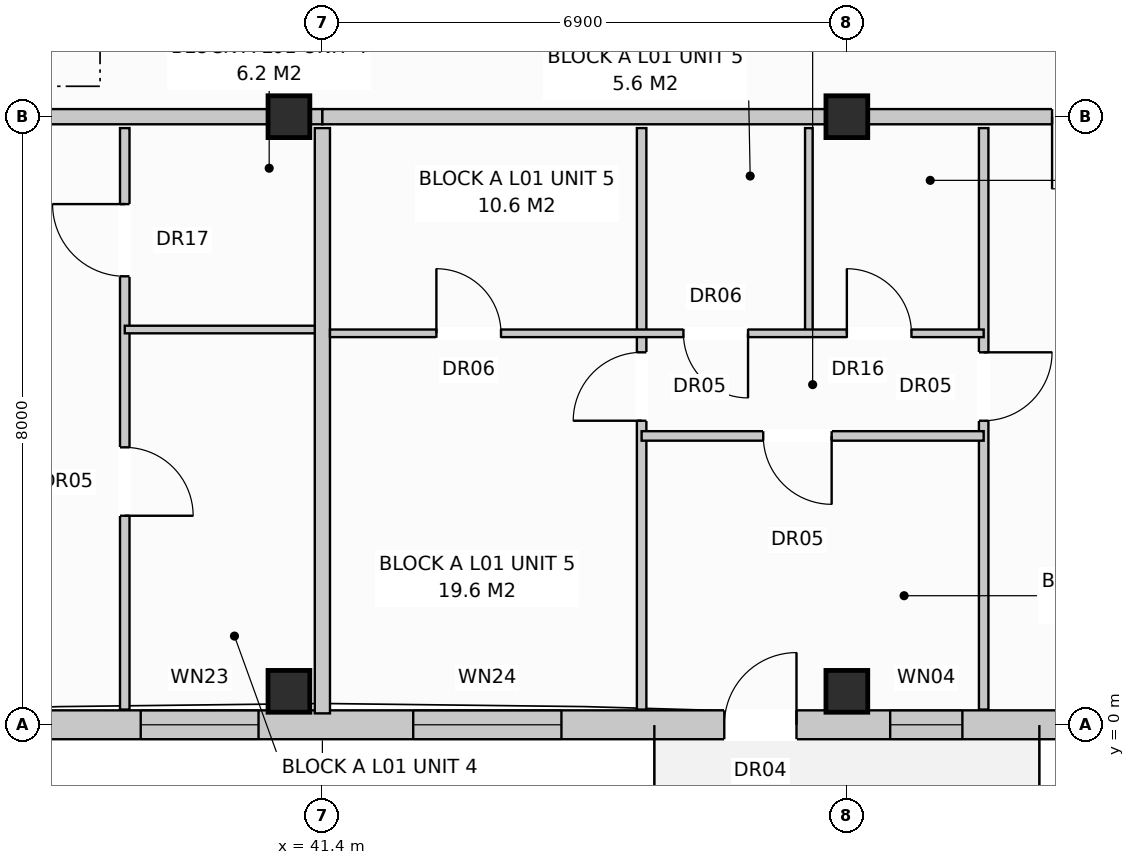
"""IFC4 building model, lengths in metres.
Left out: names, types, materials, properties, quantities, classifications, styles, units other than length and angle.
Written with IfcOpenShell. Run it as: python <this file> out.ifc"""

import sys

from ifc_helpers import new_model, si_unit, direction, frame, frame_2d, origin, origin_with_axes, origin_2d, place, context, subcontext, project, spatial, rectangle, extrude, element, fill, save


model = new_model("IFC4")
c1 = context("Model", 3, precision=1e-05, world=origin(), true_north=direction((0.0, 1.0)))
c2 = subcontext(c1, "Body", "Model", "MODEL_VIEW")
j1 = project(units=[si_unit("LENGTHUNIT", "METRE"), si_unit("PLANEANGLEUNIT", "RADIAN")], contexts=[c1])
p1 = place(None, origin())
s1 = spatial("IfcSite", under=j1, at=p1, CompositionType="ELEMENT")
p2 = place(p1, origin())
s2 = spatial("IfcBuilding", under=s1, at=p2, CompositionType="ELEMENT")
p3 = place(p2, frame((0.0, 0.0, 4.4)))
s3 = spatial("IfcBuildingStorey", under=s2, at=p3, CompositionType="ELEMENT", Elevation=4.4)
for number, where, z_axis, x_axis in (
    (1, (40.96, 0.44, 0.0), (0.0, 0.0, 1.0), (1.0, 0.0, 0.0)),
    (2, (40.96, 8.0, 0.0), (0.0, 0.0, 1.0), (1.0, 0.0, 0.0)),
    (3, (48.3, 0.44, 0.0), (0.0, 0.0, 1.0), (1.0, 0.0, 0.0)),
    (4, (48.3, 8.0, 0.0), (0.0, 0.0, 1.0), (1.0, 0.0, 0.0)),
):
    element("IfcColumn", number, at=place(p3, frame(where, z_axis=z_axis, x_axis=x_axis)), inside=s3, PredefinedType="COLUMN", context=c2, shape_type="SweptSolid", body=[
        extrude(rectangle(XDim=0.55, YDim=0.55, at=origin_2d()), origin(), (0.0, 0.0, 1.0), 3.6),
    ])
p4 = place(p3, frame((0.18, 0.0, 0.0), z_axis=(0.0, 0.0, 1.0), x_axis=(1.0, 0.0, 0.0)))
e5 = element("IfcWall", 5, at=p4, inside=s3, PredefinedType="STANDARD", context=c2, shape_type="SweptSolid", body=[
    extrude(rectangle(XDim=54.84, YDim=0.38, at=frame_2d((27.42, 0.0))), origin(), (0.0, 0.0, 1.0), 3.33),
])
p5 = place(p4, frame((5.09, 0.0, 0.0)))
e6 = element("IfcOpeningElement", 6, at=p5, cuts=e5, PredefinedType="OPENING", context=c2, shape_type="SweptSolid", body=[
    extrude(rectangle(XDim=0.95, YDim=2.1, at=frame_2d((0.475, 1.05))), frame((0.0, 0.202, 0.0), z_axis=(0.0, -1.0, 0.0), x_axis=(1.0, 0.0, 0.0)), (0.0, 0.0, 1.0), 0.404),
])
p6 = place(p4, frame((18.89, 0.0, 0.0)))
e7 = element("IfcOpeningElement", 7, at=p6, cuts=e5, PredefinedType="OPENING", context=c2, shape_type="SweptSolid", body=[
    extrude(rectangle(XDim=0.95, YDim=2.1, at=frame_2d((0.475, 1.05))), frame((0.0, 0.202, 0.0), z_axis=(0.0, -1.0, 0.0), x_axis=(1.0, 0.0, 0.0)), (0.0, 0.0, 1.0), 0.404),
])
p7 = place(p4, frame((32.69, 0.0, 0.0)))
e8 = element("IfcOpeningElement", 8, at=p7, cuts=e5, PredefinedType="OPENING", context=c2, shape_type="SweptSolid", body=[
    extrude(rectangle(XDim=0.95, YDim=2.1, at=frame_2d((0.475, 1.05))), frame((0.0, 0.202, 0.0), z_axis=(0.0, -1.0, 0.0), x_axis=(1.0, 0.0, 0.0)), (0.0, 0.0, 1.0), 0.404),
])
p8 = place(p4, frame((46.507, 0.0, 0.0)))
e9 = element("IfcOpeningElement", 9, at=p8, cuts=e5, PredefinedType="OPENING", context=c2, shape_type="SweptSolid", body=[
    extrude(rectangle(XDim=0.95, YDim=2.1, at=frame_2d((0.475, 1.05))), frame((0.0, 0.202, 0.0), z_axis=(0.0, -1.0, 0.0), x_axis=(1.0, 0.0, 0.0)), (0.0, 0.0, 1.0), 0.404),
])
p9 = place(p4, frame((0.89, 0.0, 0.8)))
e10 = element("IfcOpeningElement", 10, at=p9, cuts=e5, PredefinedType="OPENING", context=c2, shape_type="SweptSolid", body=[
    extrude(rectangle(XDim=1.8, YDim=1.7, at=frame_2d((0.9, 0.85))), frame((0.0, 0.202, 0.0), z_axis=(0.0, -1.0, 0.0), x_axis=(1.0, 0.0, 0.0)), (0.0, 0.0, 1.0), 0.404),
])
p10 = place(p4, frame((8.94, 0.0, 0.8)))
e11 = element("IfcOpeningElement", 11, at=p10, cuts=e5, PredefinedType="OPENING", context=c2, shape_type="SweptSolid", body=[
    extrude(rectangle(XDim=1.9, YDim=1.85, at=frame_2d((0.95, 0.925))), frame((0.0, 0.202, 0.0), z_axis=(0.0, -1.0, 0.0), x_axis=(1.0, 0.0, 0.0)), (0.0, 0.0, 1.0), 0.404),
])
p11 = place(p4, frame((14.615, 0.0, 0.8)))
e12 = element("IfcOpeningElement", 12, at=p11, cuts=e5, PredefinedType="OPENING", context=c2, shape_type="SweptSolid", body=[
    extrude(rectangle(XDim=1.95, YDim=1.65, at=frame_2d((0.975, 0.825))), frame((0.0, 0.202, 0.0), z_axis=(0.0, -1.0, 0.0), x_axis=(1.0, 0.0, 0.0)), (0.0, 0.0, 1.0), 0.404),
])
p12 = place(p4, frame((21.09, 0.0, 0.8)))
e13 = element("IfcOpeningElement", 13, at=p12, cuts=e5, PredefinedType="OPENING", context=c2, shape_type="SweptSolid", body=[
    extrude(rectangle(XDim=1.8, YDim=1.7, at=frame_2d((0.9, 0.85))), frame((0.0, 0.202, 0.0), z_axis=(0.0, -1.0, 0.0), x_axis=(1.0, 0.0, 0.0)), (0.0, 0.0, 1.0), 0.404),
])
p13 = place(p4, frame((24.44, 0.0, 0.8)))
e14 = element("IfcOpeningElement", 14, at=p13, cuts=e5, PredefinedType="OPENING", context=c2, shape_type="SweptSolid", body=[
    extrude(rectangle(XDim=1.9, YDim=1.85, at=frame_2d((0.95, 0.925))), frame((0.0, 0.202, 0.0), z_axis=(0.0, -1.0, 0.0), x_axis=(1.0, 0.0, 0.0)), (0.0, 0.0, 1.0), 0.404),
])
p14 = place(p4, frame((28.415, 0.0, 0.8)))
e15 = element("IfcOpeningElement", 15, at=p14, cuts=e5, PredefinedType="OPENING", context=c2, shape_type="SweptSolid", body=[
    extrude(rectangle(XDim=1.95, YDim=1.65, at=frame_2d((0.975, 0.825))), frame((0.0, 0.202, 0.0), z_axis=(0.0, -1.0, 0.0), x_axis=(1.0, 0.0, 0.0)), (0.0, 0.0, 1.0), 0.404),
])
p15 = place(p4, frame((35.59, 0.0, 0.8)))
e16 = element("IfcOpeningElement", 16, at=p15, cuts=e5, PredefinedType="OPENING", context=c2, shape_type="SweptSolid", body=[
    extrude(rectangle(XDim=1.8, YDim=1.7, at=frame_2d((0.9, 0.85))), frame((0.0, 0.202, 0.0), z_axis=(0.0, -1.0, 0.0), x_axis=(1.0, 0.0, 0.0)), (0.0, 0.0, 1.0), 0.404),
])
p16 = place(p4, frame((38.83, 0.0, 0.8)))
e17 = element("IfcOpeningElement", 17, at=p16, cuts=e5, PredefinedType="OPENING", context=c2, shape_type="SweptSolid", body=[
    extrude(rectangle(XDim=1.55, YDim=1.55, at=frame_2d((0.775, 0.775))), frame((0.0, 0.202, 0.0), z_axis=(0.0, -1.0, 0.0), x_axis=(1.0, 0.0, 0.0)), (0.0, 0.0, 1.0), 0.404),
])
p17 = place(p4, frame((42.415, 0.0, 0.8)))
e18 = element("IfcOpeningElement", 18, at=p17, cuts=e5, PredefinedType="OPENING", context=c2, shape_type="SweptSolid", body=[
    extrude(rectangle(XDim=1.95, YDim=1.65, at=frame_2d((0.975, 0.825))), frame((0.0, 0.202, 0.0), z_axis=(0.0, -1.0, 0.0), x_axis=(1.0, 0.0, 0.0)), (0.0, 0.0, 1.0), 0.404),
])
p18 = place(p4, frame((48.69, 0.0, 0.9)))
e19 = element("IfcOpeningElement", 19, at=p18, cuts=e5, PredefinedType="OPENING", context=c2, shape_type="SweptSolid", body=[
    extrude(rectangle(XDim=0.95, YDim=1.55, at=frame_2d((0.475, 0.775))), frame((0.0, 0.202, 0.0), z_axis=(0.0, -1.0, 0.0), x_axis=(1.0, 0.0, 0.0)), (0.0, 0.0, 1.0), 0.404),
])
p19 = place(p4, frame((51.44, 0.0, 0.8)))
e20 = element("IfcOpeningElement", 20, at=p19, cuts=e5, PredefinedType="OPENING", context=c2, shape_type="SweptSolid", body=[
    extrude(rectangle(XDim=1.9, YDim=1.85, at=frame_2d((0.95, 0.925))), frame((0.0, 0.202, 0.0), z_axis=(0.0, -1.0, 0.0), x_axis=(1.0, 0.0, 0.0)), (0.0, 0.0, 1.0), 0.404),
])
p20 = place(p3, frame((41.4, 7.85, 0.0), z_axis=(0.0, 0.0, 1.0), x_axis=(0.0, -1.0, 0.0)))
e21 = element("IfcWall", 21, at=p20, inside=s3, PredefinedType="PARTITIONING", context=c2, shape_type="SweptSolid", body=[
    extrude(rectangle(XDim=7.7, YDim=0.2, at=frame_2d((3.85, 0.0))), origin(), (0.0, 0.0, 1.0), 3.33),
])
p21 = place(p3, frame((34.5, 8.0, 0.0), z_axis=(0.0, 0.0, 1.0), x_axis=(1.0, 0.0, 0.0)))
e22 = element("IfcWall", 22, at=p21, inside=s3, PredefinedType="PARTITIONING", context=c2, shape_type="SweptSolid", body=[
    extrude(rectangle(XDim=6.9, YDim=0.2, at=frame_2d((3.45, 0.0))), origin(), (0.0, 0.0, 1.0), 2.77),
])
p22 = place(p21, frame((2.0, 0.0, 0.0)))
e23 = element("IfcOpeningElement", 23, at=p22, cuts=e22, PredefinedType="OPENING", context=c2, shape_type="SweptSolid", body=[
    extrude(rectangle(XDim=0.95, YDim=2.15, at=frame_2d((0.475, 1.075))), frame((0.0, 0.112, 0.0), z_axis=(0.0, -1.0, 0.0), x_axis=(1.0, 0.0, 0.0)), (0.0, 0.0, 1.0), 0.224),
])
p23 = place(p3, frame((38.8, 7.85, 0.0), z_axis=(0.0, 0.0, 1.0), x_axis=(0.0, -1.0, 0.0)))
e24 = element("IfcWall", 24, at=p23, inside=s3, PredefinedType="PARTITIONING", context=c2, shape_type="SweptSolid", body=[
    extrude(rectangle(XDim=7.65, YDim=0.125, at=frame_2d((3.825, 0.0))), origin(), (0.0, 0.0, 1.0), 3.33),
])
p24 = place(p23, frame((1.0, 0.0, 0.0)))
e25 = element("IfcOpeningElement", 25, at=p24, cuts=e24, PredefinedType="OPENING", context=c2, shape_type="SweptSolid", body=[
    extrude(rectangle(XDim=0.95, YDim=2.1, at=frame_2d((0.475, 1.05))), frame((0.0, 0.074, 0.0), z_axis=(0.0, -1.0, 0.0), x_axis=(1.0, 0.0, 0.0)), (0.0, 0.0, 1.0), 0.149),
])
p25 = place(p23, frame((4.2, 0.0, 0.0)))
e26 = element("IfcOpeningElement", 26, at=p25, cuts=e24, PredefinedType="OPENING", context=c2, shape_type="SweptSolid", body=[
    extrude(rectangle(XDim=0.9, YDim=2.1, at=frame_2d((0.45, 1.05))), frame((0.0, 0.074, 0.0), z_axis=(0.0, -1.0, 0.0), x_axis=(1.0, 0.0, 0.0)), (0.0, 0.0, 1.0), 0.149),
])
p26 = place(p3, frame((38.8, 5.2, 0.0), z_axis=(0.0, 0.0, 1.0), x_axis=(1.0, 0.0, 0.0)))
e27 = element("IfcWall", 27, at=p26, inside=s3, PredefinedType="PARTITIONING", context=c2, shape_type="SweptSolid", body=[
    extrude(rectangle(XDim=2.5, YDim=0.1, at=frame_2d((1.25, 0.0))), origin(), (0.0, 0.0, 1.0), 3.33),
])
p27 = place(p3, frame((41.4, 8.0, 0.0), z_axis=(0.0, 0.0, 1.0), x_axis=(1.0, 0.0, 0.0)))
e28 = element("IfcWall", 28, at=p27, inside=s3, PredefinedType="PARTITIONING", context=c2, shape_type="SweptSolid", body=[
    extrude(rectangle(XDim=13.8, YDim=0.2, at=frame_2d((6.9, 0.0))), origin(), (0.0, 0.0, 1.0), 2.77),
])
p28 = place(p27, frame((9.6, 0.0, 0.0)))
e29 = element("IfcOpeningElement", 29, at=p28, cuts=e28, PredefinedType="OPENING", context=c2, shape_type="SweptSolid", body=[
    extrude(rectangle(XDim=0.95, YDim=2.15, at=frame_2d((0.475, 1.075))), frame((0.0, 0.112, 0.0), z_axis=(0.0, -1.0, 0.0), x_axis=(1.0, 0.0, 0.0)), (0.0, 0.0, 1.0), 0.224),
])
p29 = place(p3, frame((50.1, 7.85, 0.0), z_axis=(0.0, 0.0, 1.0), x_axis=(0.0, -1.0, 0.0)))
e30 = element("IfcWall", 30, at=p29, inside=s3, PredefinedType="PARTITIONING", context=c2, shape_type="SweptSolid", body=[
    extrude(rectangle(XDim=7.65, YDim=0.125, at=frame_2d((3.825, 0.0))), origin(), (0.0, 0.0, 1.0), 3.33),
])
p30 = place(p29, frame((2.95, 0.0, 0.0)))
e31 = element("IfcOpeningElement", 31, at=p30, cuts=e30, PredefinedType="OPENING", context=c2, shape_type="SweptSolid", body=[
    extrude(rectangle(XDim=0.9, YDim=2.1, at=frame_2d((0.45, 1.05))), frame((0.0, 0.074, 0.0), z_axis=(0.0, -1.0, 0.0), x_axis=(1.0, 0.0, 0.0)), (0.0, 0.0, 1.0), 0.149),
])
p31 = place(p3, frame((45.6, 7.85, 0.0), z_axis=(0.0, 0.0, 1.0), x_axis=(0.0, -1.0, 0.0)))
e32 = element("IfcWall", 32, at=p31, inside=s3, PredefinedType="PARTITIONING", context=c2, shape_type="SweptSolid", body=[
    extrude(rectangle(XDim=7.65, YDim=0.125, at=frame_2d((3.825, 0.0))), origin(), (0.0, 0.0, 1.0), 3.33),
])
p32 = place(p31, frame((2.95, 0.0, 0.0)))
e33 = element("IfcOpeningElement", 33, at=p32, cuts=e32, PredefinedType="OPENING", context=c2, shape_type="SweptSolid", body=[
    extrude(rectangle(XDim=0.9, YDim=2.1, at=frame_2d((0.45, 1.05))), frame((0.0, 0.074, 0.0), z_axis=(0.0, -1.0, 0.0), x_axis=(1.0, 0.0, 0.0)), (0.0, 0.0, 1.0), 0.149),
])
p33 = place(p3, frame((47.8, 7.85, 0.0), z_axis=(0.0, 0.0, 1.0), x_axis=(0.0, -1.0, 0.0)))
e34 = element("IfcWall", 34, at=p33, inside=s3, PredefinedType="PARTITIONING", context=c2, shape_type="SweptSolid", body=[
    extrude(rectangle(XDim=2.7, YDim=0.1, at=frame_2d((1.35, 0.0))), origin(), (0.0, 0.0, 1.0), 3.33),
])
p34 = place(p3, frame((41.5, 5.15, 0.0), z_axis=(0.0, 0.0, 1.0), x_axis=(1.0, 0.0, 0.0)))
e35 = element("IfcWall", 35, at=p34, inside=s3, PredefinedType="PARTITIONING", context=c2, shape_type="SweptSolid", body=[
    extrude(rectangle(XDim=8.6, YDim=0.1, at=frame_2d((4.3, 0.0))), origin(), (0.0, 0.0, 1.0), 3.33),
])
p35 = place(p34, frame((1.4, 0.0, 0.0)))
e36 = element("IfcOpeningElement", 36, at=p35, cuts=e35, PredefinedType="OPENING", context=c2, shape_type="SweptSolid", body=[
    extrude(rectangle(XDim=0.85, YDim=2.05, at=frame_2d((0.425, 1.025))), frame((0.0, 0.062, 0.0), z_axis=(0.0, -1.0, 0.0), x_axis=(1.0, 0.0, 0.0)), (0.0, 0.0, 1.0), 0.124),
])
p36 = place(p34, frame((4.65, 0.0, 0.0)))
e37 = element("IfcOpeningElement", 37, at=p36, cuts=e35, PredefinedType="OPENING", context=c2, shape_type="SweptSolid", body=[
    extrude(rectangle(XDim=0.85, YDim=2.05, at=frame_2d((0.425, 1.025))), frame((0.0, 0.062, 0.0), z_axis=(0.0, -1.0, 0.0), x_axis=(1.0, 0.0, 0.0)), (0.0, 0.0, 1.0), 0.124),
])
p37 = place(p34, frame((6.8, 0.0, 0.0)))
e38 = element("IfcOpeningElement", 38, at=p37, cuts=e35, PredefinedType="OPENING", context=c2, shape_type="SweptSolid", body=[
    extrude(rectangle(XDim=0.85, YDim=2.1, at=frame_2d((0.425, 1.05))), frame((0.0, 0.062, 0.0), z_axis=(0.0, -1.0, 0.0), x_axis=(1.0, 0.0, 0.0)), (0.0, 0.0, 1.0), 0.124),
])
p38 = place(p3, frame((45.6, 3.8, 0.0), z_axis=(0.0, 0.0, 1.0), x_axis=(1.0, 0.0, 0.0)))
e39 = element("IfcWall", 39, at=p38, inside=s3, PredefinedType="PARTITIONING", context=c2, shape_type="SweptSolid", body=[
    extrude(rectangle(XDim=4.5, YDim=0.125, at=frame_2d((2.25, 0.0))), origin(), (0.0, 0.0, 1.0), 3.33),
])
p39 = place(p38, frame((1.6, 0.0, 0.0)))
e40 = element("IfcOpeningElement", 40, at=p39, cuts=e39, PredefinedType="OPENING", context=c2, shape_type="SweptSolid", body=[
    extrude(rectangle(XDim=0.9, YDim=2.1, at=frame_2d((0.45, 1.05))), frame((0.0, 0.074, 0.0), z_axis=(0.0, -1.0, 0.0), x_axis=(1.0, 0.0, 0.0)), (0.0, 0.0, 1.0), 0.149),
])
p40 = place(p8, origin_with_axes())
e41 = element("IfcDoor", 41, at=p40, inside=s3, OperationType="SINGLE_SWING_RIGHT", PredefinedType="DOOR", context=c2, shape_type="SweptSolid", body=[
    extrude(rectangle(XDim=0.95, YDim=2.1, at=frame_2d((0.475, 1.05))), frame((0.0, 0.025, 0.0), z_axis=(0.0, -1.0, 0.0), x_axis=(1.0, 0.0, 0.0)), (0.0, 0.0, 1.0), 0.05),
])
fill(e9, e41)
p41 = place(p16, origin_with_axes())
e42 = element("IfcWindow", 42, at=p41, inside=s3, PartitioningType="SINGLE_PANEL", PredefinedType="WINDOW", context=c2, shape_type="SweptSolid", body=[
    extrude(rectangle(XDim=1.55, YDim=1.55, at=frame_2d((0.775, 0.775))), frame((0.0, 0.03, 0.0), z_axis=(0.0, -1.0, 0.0), x_axis=(1.0, 0.0, 0.0)), (0.0, 0.0, 1.0), 0.06),
])
fill(e17, e42)
p42 = place(p17, origin_with_axes())
e43 = element("IfcWindow", 43, at=p42, inside=s3, PartitioningType="SINGLE_PANEL", PredefinedType="WINDOW", context=c2, shape_type="SweptSolid", body=[
    extrude(rectangle(XDim=1.95, YDim=1.65, at=frame_2d((0.975, 0.825))), frame((0.0, 0.03, 0.0), z_axis=(0.0, -1.0, 0.0), x_axis=(1.0, 0.0, 0.0)), (0.0, 0.0, 1.0), 0.06),
])
fill(e18, e43)
p43 = place(p18, origin_with_axes())
e44 = element("IfcWindow", 44, at=p43, inside=s3, PartitioningType="SINGLE_PANEL", PredefinedType="WINDOW", context=c2, shape_type="SweptSolid", body=[
    extrude(rectangle(XDim=0.95, YDim=1.55, at=frame_2d((0.475, 0.775))), frame((0.0, 0.03, 0.0), z_axis=(0.0, -1.0, 0.0), x_axis=(1.0, 0.0, 0.0)), (0.0, 0.0, 1.0), 0.06),
])
fill(e19, e44)
p44 = place(p24, frame((0.95, 0.0, 0.0), z_axis=(0.0, 0.0, 1.0), x_axis=(-1.0, 0.0, 0.0)))
e45 = element("IfcDoor", 45, at=p44, inside=s3, OperationType="SINGLE_SWING_LEFT", PredefinedType="DOOR", context=c2, shape_type="SweptSolid", body=[
    extrude(rectangle(XDim=0.95, YDim=2.1, at=frame_2d((0.475, 1.05))), frame((0.0, 0.025, 0.0), z_axis=(0.0, -1.0, 0.0), x_axis=(1.0, 0.0, 0.0)), (0.0, 0.0, 1.0), 0.05),
])
fill(e25, e45)
p45 = place(p25, origin_with_axes())
e46 = element("IfcDoor", 46, at=p45, inside=s3, OperationType="SINGLE_SWING_RIGHT", PredefinedType="DOOR", context=c2, shape_type="SweptSolid", body=[
    extrude(rectangle(XDim=0.9, YDim=2.1, at=frame_2d((0.45, 1.05))), frame((0.0, 0.025, 0.0), z_axis=(0.0, -1.0, 0.0), x_axis=(1.0, 0.0, 0.0)), (0.0, 0.0, 1.0), 0.05),
])
fill(e26, e46)
p46 = place(p28, frame((0.95, 0.0, 0.0), z_axis=(0.0, 0.0, 1.0), x_axis=(-1.0, 0.0, 0.0)))
e47 = element("IfcDoor", 47, at=p46, inside=s3, OperationType="SINGLE_SWING_LEFT", PredefinedType="DOOR", context=c2, shape_type="SweptSolid", body=[
    extrude(rectangle(XDim=0.95, YDim=2.15, at=frame_2d((0.475, 1.075))), frame((0.0, 0.025, 0.0), z_axis=(0.0, -1.0, 0.0), x_axis=(1.0, 0.0, 0.0)), (0.0, 0.0, 1.0), 0.05),
])
fill(e29, e47)
p47 = place(p30, origin_with_axes())
e48 = element("IfcDoor", 48, at=p47, inside=s3, OperationType="SINGLE_SWING_LEFT", PredefinedType="DOOR", context=c2, shape_type="SweptSolid", body=[
    extrude(rectangle(XDim=0.9, YDim=2.1, at=frame_2d((0.45, 1.05))), frame((0.0, 0.025, 0.0), z_axis=(0.0, -1.0, 0.0), x_axis=(1.0, 0.0, 0.0)), (0.0, 0.0, 1.0), 0.05),
])
fill(e31, e48)
p48 = place(p32, frame((0.9, 0.0, 0.0), z_axis=(0.0, 0.0, 1.0), x_axis=(-1.0, 0.0, 0.0)))
e49 = element("IfcDoor", 49, at=p48, inside=s3, OperationType="SINGLE_SWING_RIGHT", PredefinedType="DOOR", context=c2, shape_type="SweptSolid", body=[
    extrude(rectangle(XDim=0.9, YDim=2.1, at=frame_2d((0.45, 1.05))), frame((0.0, 0.025, 0.0), z_axis=(0.0, -1.0, 0.0), x_axis=(1.0, 0.0, 0.0)), (0.0, 0.0, 1.0), 0.05),
])
fill(e33, e49)
p49 = place(p35, origin_with_axes())
e50 = element("IfcDoor", 50, at=p49, inside=s3, OperationType="SINGLE_SWING_LEFT", PredefinedType="DOOR", context=c2, shape_type="SweptSolid", body=[
    extrude(rectangle(XDim=0.85, YDim=2.05, at=frame_2d((0.425, 1.025))), frame((0.0, 0.025, 0.0), z_axis=(0.0, -1.0, 0.0), x_axis=(1.0, 0.0, 0.0)), (0.0, 0.0, 1.0), 0.05),
])
fill(e36, e50)
p50 = place(p36, frame((0.85, 0.0, 0.0), z_axis=(0.0, 0.0, 1.0), x_axis=(-1.0, 0.0, 0.0)))
e51 = element("IfcDoor", 51, at=p50, inside=s3, OperationType="SINGLE_SWING_RIGHT", PredefinedType="DOOR", context=c2, shape_type="SweptSolid", body=[
    extrude(rectangle(XDim=0.85, YDim=2.05, at=frame_2d((0.425, 1.025))), frame((0.0, 0.025, 0.0), z_axis=(0.0, -1.0, 0.0), x_axis=(1.0, 0.0, 0.0)), (0.0, 0.0, 1.0), 0.05),
])
fill(e37, e51)
p51 = place(p37, origin_with_axes())
e52 = element("IfcDoor", 52, at=p51, inside=s3, OperationType="SINGLE_SWING_LEFT", PredefinedType="DOOR", context=c2, shape_type="SweptSolid", body=[
    extrude(rectangle(XDim=0.85, YDim=2.1, at=frame_2d((0.425, 1.05))), frame((0.0, 0.025, 0.0), z_axis=(0.0, -1.0, 0.0), x_axis=(1.0, 0.0, 0.0)), (0.0, 0.0, 1.0), 0.05),
])
fill(e38, e52)
p52 = place(p39, frame((0.9, 0.0, 0.0), z_axis=(0.0, 0.0, 1.0), x_axis=(-1.0, 0.0, 0.0)))
e53 = element("IfcDoor", 53, at=p52, inside=s3, OperationType="SINGLE_SWING_RIGHT", PredefinedType="DOOR", context=c2, shape_type="SweptSolid", body=[
    extrude(rectangle(XDim=0.9, YDim=2.1, at=frame_2d((0.45, 1.05))), frame((0.0, 0.025, 0.0), z_axis=(0.0, -1.0, 0.0), x_axis=(1.0, 0.0, 0.0)), (0.0, 0.0, 1.0), 0.05),
])
fill(e40, e53)
save(model, sys.argv[1])
